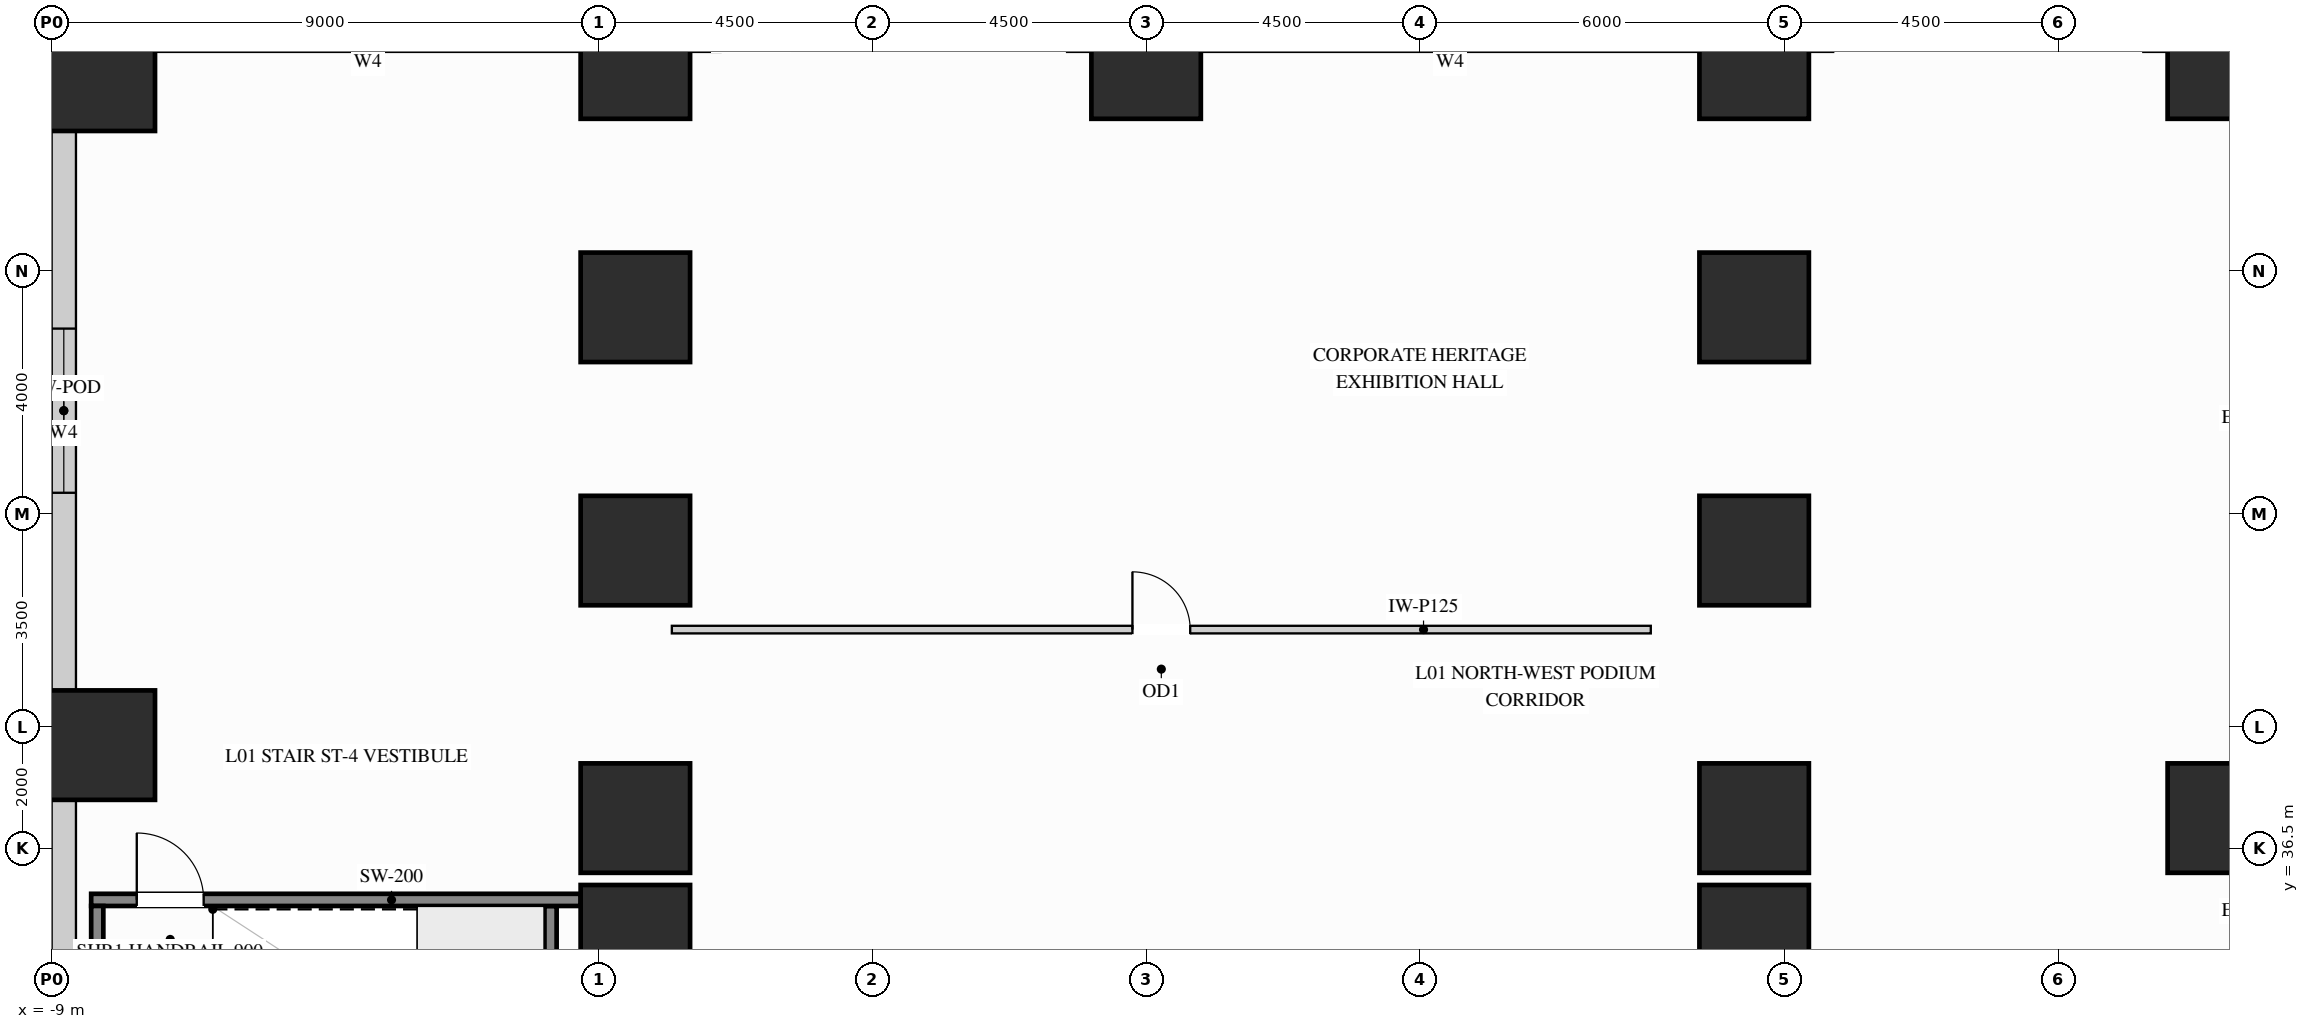
"""IFC4 building model, lengths in metres.
Left out: names, types, materials, properties, quantities, classifications, styles, units other than length and angle.
Written with IfcOpenShell. Run it as: python <this file> out.ifc"""

import sys

from ifc_helpers import new_model, si_unit, direction, frame, frame_2d, origin, origin_2d, place, context, subcontext, project, spatial, rectangle, extrude, source, transform, mapped, element, fill, save


model = new_model("IFC4")
c1 = context("Model", 3, precision=1e-05, world=origin(), true_north=direction((0.0, 1.0)))
c2 = subcontext(c1, "Body", "Model", "MODEL_VIEW")
j1 = project(units=[si_unit("LENGTHUNIT", "METRE"), si_unit("PLANEANGLEUNIT", "RADIAN")], contexts=[c1])
p1 = place(None, origin())
s1 = spatial("IfcSite", under=j1, at=p1, CompositionType="ELEMENT")
p2 = place(p1, origin())
s2 = spatial("IfcBuilding", under=s1, at=p2, CompositionType="ELEMENT")
p3 = place(p2, frame((0.0, 0.0, 4.5)))
s3 = spatial("IfcBuildingStorey", under=s2, at=p3, CompositionType="ELEMENT", Elevation=4.5)
m1 = source(origin(), c2, "Body", "SweptSolid", [
    extrude(rectangle(XDim=1.8, YDim=1.8, at=origin_2d()), origin(), (0.0, 0.0, 1.0), 4.25),
])
for number, where, z_axis, x_axis in (
    (1, (-8.2, 38.2, 0.0), (0.0, 0.0, 1.0), (1.0, 0.0, 0.0)),
    (2, (-8.2, 49.2, 0.0), (0.0, 0.0, 1.0), (1.0, 0.0, 0.0)),
    (3, (0.6, 35.0, 0.0), (0.0, 0.0, 1.0), (1.0, 0.0, 0.0)),
    (4, (0.6, 37.0, 0.0), (0.0, 0.0, 1.0), (1.0, 0.0, 0.0)),
    (5, (0.6, 41.4, 0.0), (0.0, 0.0, 1.0), (1.0, 0.0, 0.0)),
    (6, (0.6, 45.4, 0.0), (0.0, 0.0, 1.0), (1.0, 0.0, 0.0)),
    (7, (0.6, 49.4, 0.0), (0.0, 0.0, 1.0), (1.0, 0.0, 0.0)),
    (8, (9.0, 49.4, 0.0), (0.0, 0.0, 1.0), (1.0, 0.0, 0.0)),
    (9, (19.0, 49.4, 0.0), (0.0, 0.0, 1.0), (1.0, 0.0, 0.0)),
    (10, (26.7, 49.4, 0.0), (0.0, 0.0, 1.0), (1.0, 0.0, 0.0)),
    (11, (26.7, 37.0, 0.0), (0.0, 0.0, 1.0), (1.0, 0.0, 0.0)),
    (12, (19.0, 35.0, 0.0), (0.0, 0.0, 1.0), (1.0, 0.0, 0.0)),
    (13, (19.0, 37.0, 0.0), (0.0, 0.0, 1.0), (1.0, 0.0, 0.0)),
    (14, (19.0, 41.4, 0.0), (0.0, 0.0, 1.0), (1.0, 0.0, 0.0)),
    (15, (19.0, 45.4, 0.0), (0.0, 0.0, 1.0), (1.0, 0.0, 0.0)),
):
    element("IfcColumn", number, at=place(p3, frame(where, z_axis=z_axis, x_axis=x_axis)), inside=s3, PredefinedType="COLUMN", context=c2, shape_type="MappedRepresentation", body=[
        mapped(m1, transform((0.0, 0.0, 0.0), x_axis=(1.0, 0.0, 0.0), y_axis=(0.0, 1.0, 0.0), z_axis=(0.0, 0.0, 1.0))),
    ])
p4 = place(p3, frame((-8.8, 48.302, 0.0), z_axis=(0.0, 0.0, 1.0), x_axis=(0.0, -1.0, 0.0)))
e16 = element("IfcWall", 16, at=p4, inside=s3, PredefinedType="SOLIDWALL", context=c2, shape_type="SweptSolid", body=[
    extrude(rectangle(XDim=9.204, YDim=0.4, at=frame_2d((4.602, 0.0))), origin(), (0.0, 0.0, 1.0), 3.185),
])
p5 = place(p4, frame((3.252, 0.0, 0.65)))
e17 = element("IfcOpeningElement", 17, at=p5, cuts=e16, PredefinedType="OPENING", context=c2, shape_type="SweptSolid", body=[
    extrude(rectangle(XDim=2.7, YDim=2.355, at=frame_2d((1.35, 1.177))), frame((0.0, 0.21, 0.0), z_axis=(0.0, -1.0, 0.0), x_axis=(1.0, 0.0, 0.0)), (0.0, 0.0, 1.0), 0.42),
])
p6 = place(p3, frame((-8.8, 37.302, 0.0), z_axis=(0.0, 0.0, 1.0), x_axis=(0.0, -1.0, 0.0)))
e18 = element("IfcWall", 18, at=p6, inside=s3, PredefinedType="SOLIDWALL", context=c2, shape_type="SweptSolid", body=[
    extrude(rectangle(XDim=9.604, YDim=0.4, at=frame_2d((4.802, 0.0))), origin(), (0.0, 0.0, 1.0), 3.185),
])
p7 = place(p6, frame((3.452, 0.0, 0.65)))
e19 = element("IfcOpeningElement", 19, at=p7, cuts=e18, PredefinedType="OPENING", context=c2, shape_type="SweptSolid", body=[
    extrude(rectangle(XDim=2.7, YDim=2.355, at=frame_2d((1.35, 1.177))), frame((0.0, 0.21, 0.0), z_axis=(0.0, -1.0, 0.0), x_axis=(1.0, 0.0, 0.0)), (0.0, 0.0, 1.0), 0.42),
])
p8 = place(p3, frame((1.2, 40.1, 0.0), z_axis=(0.0, 0.0, 1.0), x_axis=(1.0, 0.0, 0.0)))
e20 = element("IfcWall", 20, at=p8, inside=s3, PredefinedType="PARTITIONING", context=c2, shape_type="SweptSolid", body=[
    extrude(rectangle(XDim=16.1, YDim=0.125, at=frame_2d((8.05, 0.0))), origin(), (0.0, 0.0, 1.0), 3.686),
])
p9 = place(p8, frame((7.575, 0.0, 0.0)))
e21 = element("IfcOpeningElement", 21, at=p9, cuts=e20, PredefinedType="OPENING", context=c2, shape_type="SweptSolid", body=[
    extrude(rectangle(XDim=0.95, YDim=2.15, at=frame_2d((0.475, 1.075))), frame((0.0, 0.073, 0.0), z_axis=(0.0, -1.0, 0.0), x_axis=(1.0, 0.0, 0.0)), (0.0, 0.0, 1.0), 0.145),
])
m2 = source(origin(), c2, "Body", "SweptSolid", [
    extrude(rectangle(XDim=3.56, YDim=0.2, at=frame_2d((1.78, 0.0))), origin(), (0.0, 0.0, 1.0), 4.25),
])
p10 = place(p3, frame((-0.795, 31.995, 0.0), z_axis=(0.0, 0.0, 1.0), x_axis=(0.0, 1.0, 0.0)))
e22 = element("IfcWall", 22, at=p10, inside=s3, PredefinedType="SHEAR", context=c2, shape_type="MappedRepresentation", body=[
    mapped(m2, transform((0.0, 0.0, 0.0), x_axis=(1.0, 0.0, 0.0), y_axis=(0.0, 1.0, 0.0), z_axis=(0.0, 0.0, 1.0))),
])
p11 = place(p3, frame((-8.35, 35.655, 0.0), z_axis=(0.0, 0.0, 1.0), x_axis=(1.0, 0.0, 0.0)))
e23 = element("IfcWall", 23, at=p11, inside=s3, PredefinedType="SHEAR", context=c2, shape_type="SweptSolid", body=[
    extrude(rectangle(XDim=8.05, YDim=0.2, at=frame_2d((4.025, 0.0))), origin(), (0.0, 0.0, 1.0), 4.25),
])
p12 = place(p11, frame((0.75, 0.0, 0.0)))
e24 = element("IfcOpeningElement", 24, at=p12, cuts=e23, PredefinedType="OPENING", context=c2, shape_type="SweptSolid", body=[
    extrude(rectangle(XDim=1.1, YDim=2.15, at=frame_2d((0.55, 1.075))), frame((0.0, 0.11, 0.0), z_axis=(0.0, -1.0, 0.0), x_axis=(1.0, 0.0, 0.0)), (0.0, 0.0, 1.0), 0.22),
])
p13 = place(p3, frame((-8.25, 31.995, 0.0), z_axis=(0.0, 0.0, 1.0), x_axis=(0.0, 1.0, 0.0)))
e25 = element("IfcWall", 25, at=p13, inside=s3, PredefinedType="SHEAR", context=c2, shape_type="MappedRepresentation", body=[
    mapped(m2, transform((0.0, 0.0, 0.0), x_axis=(1.0, 0.0, 0.0), y_axis=(0.0, 1.0, 0.0), z_axis=(0.0, 0.0, 1.0))),
])
m3 = source(origin(), c2, "Body", "SweptSolid", [
    extrude(rectangle(XDim=0.95, YDim=2.15, at=frame_2d((0.475, 1.075))), frame((0.0, 0.025, 0.0), z_axis=(0.0, -1.0, 0.0), x_axis=(1.0, 0.0, 0.0)), (0.0, 0.0, 1.0), 0.05),
])
p14 = place(p9, origin())
e26 = element("IfcDoor", 26, at=p14, inside=s3, OperationType="SINGLE_SWING_LEFT", PredefinedType="DOOR", context=c2, shape_type="MappedRepresentation", body=[
    mapped(m3, transform((0.0, 0.0, 0.0), x_axis=(1.0, 0.0, 0.0), y_axis=(0.0, 1.0, 0.0), z_axis=(0.0, 0.0, 1.0))),
])
fill(e21, e26)
m4 = source(origin(), c2, "Body", "SweptSolid", [
    extrude(rectangle(XDim=1.1, YDim=2.15, at=frame_2d((0.55, 1.075))), frame((0.0, 0.025, 0.0), z_axis=(0.0, -1.0, 0.0), x_axis=(1.0, 0.0, 0.0)), (0.0, 0.0, 1.0), 0.05),
])
p15 = place(p12, origin())
e27 = element("IfcDoor", 27, at=p15, inside=s3, OperationType="SINGLE_SWING_LEFT", PredefinedType="DOOR", context=c2, shape_type="MappedRepresentation", body=[
    mapped(m4, transform((0.0, 0.0, 0.0), x_axis=(1.0, 0.0, 0.0), y_axis=(0.0, 1.0, 0.0), z_axis=(0.0, 0.0, 1.0))),
])
fill(e24, e27)
m5 = source(origin(), c2, "Body", "SweptSolid", [
    extrude(rectangle(XDim=2.7, YDim=2.355, at=frame_2d((1.35, 1.177))), frame((0.0, 0.03, 0.0), z_axis=(0.0, -1.0, 0.0), x_axis=(1.0, 0.0, 0.0)), (0.0, 0.0, 1.0), 0.06),
])
p16 = place(p5, origin())
e28 = element("IfcWindow", 28, at=p16, inside=s3, PartitioningType="SINGLE_PANEL", PredefinedType="WINDOW", context=c2, shape_type="MappedRepresentation", body=[
    mapped(m5, transform((0.0, 0.0, 0.0), x_axis=(1.0, 0.0, 0.0), y_axis=(0.0, 1.0, 0.0), z_axis=(0.0, 0.0, 1.0))),
])
fill(e17, e28)
save(model, sys.argv[1])
